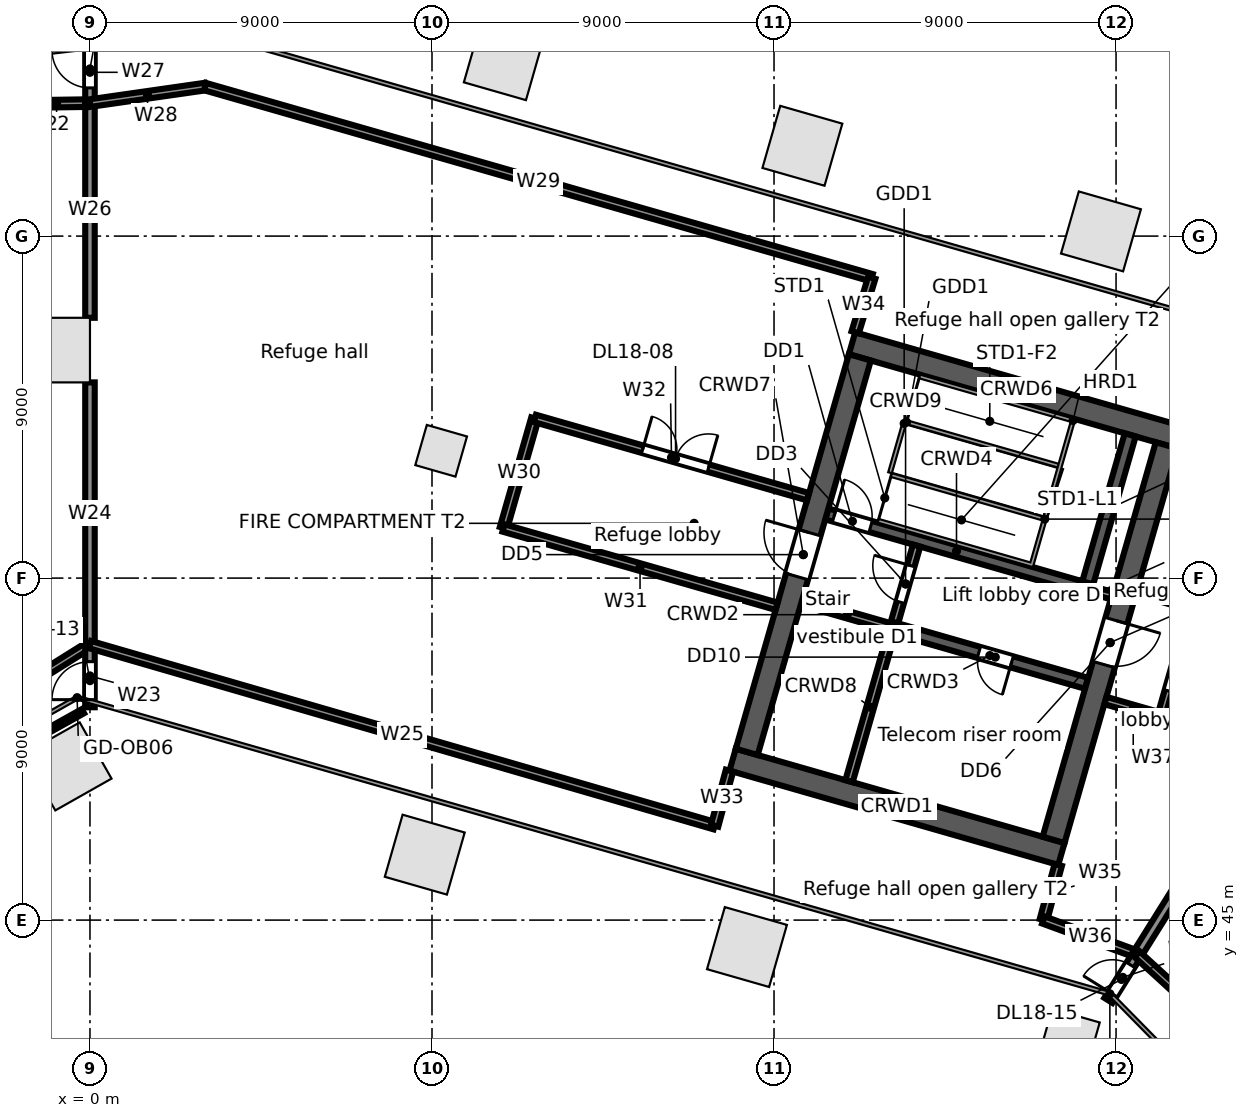
"""IFC4 building model, lengths in metres.
Left out: names, types, materials, properties, quantities, classifications, styles, units other than length and angle.
Written with IfcOpenShell. Run it as: python <this file> out.ifc"""

import sys

from ifc_helpers import new_model, si_unit, direction, frame, frame_2d, origin, origin_2d, place, context, subcontext, project, spatial, rectangle, extrude, element, fill, save


model = new_model("IFC4")
c1 = context("Model", 3, precision=1e-05, world=origin(), true_north=direction((0.0, 1.0)))
c2 = subcontext(c1, "Body", "Model", "MODEL_VIEW")
j1 = project(units=[si_unit("LENGTHUNIT", "METRE"), si_unit("PLANEANGLEUNIT", "RADIAN")], contexts=[c1])
p1 = place(None, origin())
s1 = spatial("IfcSite", under=j1, at=p1, CompositionType="ELEMENT")
p2 = place(p1, origin())
s2 = spatial("IfcBuilding", under=s1, at=p2, CompositionType="ELEMENT")
p3 = place(p2, frame((0.0, 0.0, 91.5)))
s3 = spatial("IfcBuildingStorey", under=s2, at=p3, CompositionType="ELEMENT", Elevation=91.5)
for number, where, z_axis, x_axis in (
    (1, (26.603, 63.124, 0.0), (0.0, 0.0, 1.0), (-0.961, 0.276, 0.0)),
    (2, (18.746, 65.376, 0.0), (0.0, 0.0, 1.0), (-0.961, 0.276, 0.0)),
    (3, (10.89, 67.629, 0.0), (0.0, 0.0, 1.0), (-0.961, 0.276, 0.0)),
    (4, (-0.591, 49.044, 0.0), (0.0, 0.0, 1.0), (0.87, 0.492, 0.0)),
    (5, (8.81, 46.722, 0.0), (0.0, 0.0, 1.0), (0.961, -0.276, 0.0)),
    (6, (17.288, 44.291, 0.0), (0.0, 0.0, 1.0), (0.961, -0.276, 0.0)),
):
    element("IfcColumn", number, at=place(p3, frame(where, z_axis=z_axis, x_axis=x_axis)), inside=s3, PredefinedType="COLUMN", context=c2, shape_type="SweptSolid", body=[
        extrude(rectangle(XDim=1.7, YDim=1.7, at=origin_2d()), origin(), (0.0, 0.0, 1.0), 5.6),
    ])
p4 = place(p3, frame((25.767, 41.86, 0.0), z_axis=(0.0, 0.0, 1.0), x_axis=(0.961261695938, -0.275637355817, 0.0)))
e7 = element("IfcColumn", 7, at=p4, inside=s3, PredefinedType="COLUMN", context=c2, shape_type="SweptSolid", body=[
    extrude(rectangle(XDim=1.3, YDim=1.3, at=origin_2d()), origin(), (0.0, 0.0, 1.0), 5.6),
])
p5 = place(p3, frame((-0.85, 60.0, 0.0), z_axis=(0.0, 0.0, 1.0), x_axis=(0.0, 1.0, 0.0)))
e8 = element("IfcColumn", 8, at=p5, inside=s3, PredefinedType="COLUMN", context=c2, shape_type="SweptSolid", body=[
    extrude(rectangle(XDim=1.7, YDim=1.7, at=origin_2d()), origin(), (0.0, 0.0, 1.0), 5.6),
])
p6 = place(p3, frame((9.241, 57.35, 0.0), z_axis=(0.0, 0.0, 1.0), x_axis=(0.961261695938, -0.275637355817, 0.0)))
e9 = element("IfcColumn", 9, at=p6, inside=s3, PredefinedType="COLUMN", context=c2, shape_type="SweptSolid", body=[
    extrude(rectangle(XDim=1.1, YDim=1.1, at=origin_2d()), origin(), (0.0, 0.0, 1.0), 5.6),
])
p7 = place(p3, frame((16.911, 49.221, 0.0), z_axis=(0.0, 0.0, 1.0), x_axis=(0.96126248289, -0.275634611374, 0.0)))
e10 = element("IfcWall", 10, at=p7, inside=s3, PredefinedType="SOLIDWALL", context=c2, shape_type="SweptSolid", body=[
    extrude(rectangle(XDim=9.0, YDim=0.6, at=frame_2d((4.5, 0.0))), origin(), (0.0, 0.0, 1.0), 5.28),
])
p8 = place(p3, frame((18.728, 53.382, 0.0), z_axis=(0.0, 0.0, 1.0), x_axis=(0.961247070632, -0.275688355216, 0.0)))
e11 = element("IfcWall", 11, at=p8, inside=s3, PredefinedType="SOLIDWALL", context=c2, shape_type="SweptSolid", body=[
    extrude(rectangle(XDim=2.5, YDim=0.2, at=frame_2d((1.25, 0.0))), origin(), (0.0, 0.0, 1.0), 5.28),
])
p9 = place(p3, frame((21.131, 52.692, 0.0), z_axis=(0.0, 0.0, 1.0), x_axis=(0.961271492568, -0.275603188616, 0.0)))
e12 = element("IfcWall", 12, at=p9, inside=s3, PredefinedType="SOLIDWALL", context=c2, shape_type="SweptSolid", body=[
    extrude(rectangle(XDim=5.3, YDim=0.3, at=frame_2d((2.65, 0.0))), origin(), (0.0, 0.0, 1.0), 5.28),
])
p10 = place(p9, frame((2.35, 0.0, 0.0)))
e13 = element("IfcOpeningElement", 13, at=p10, cuts=e12, PredefinedType="OPENING", context=c2, shape_type="SweptSolid", body=[
    extrude(rectangle(XDim=0.9, YDim=2.1, at=frame_2d((0.45, 1.05))), frame((0.0, 0.16, 0.0), z_axis=(0.0, -1.0, 0.0), x_axis=(1.0, 0.0, 0.0)), (0.0, 0.0, 1.0), 0.32),
])
p11 = place(p3, frame((19.389, 55.689, 0.0), z_axis=(0.0, 0.0, 1.0), x_axis=(0.961261397636, -0.275638396117, 0.0)))
e14 = element("IfcWall", 14, at=p11, inside=s3, PredefinedType="SOLIDWALL", context=c2, shape_type="SweptSolid", body=[
    extrude(rectangle(XDim=7.1, YDim=0.3, at=frame_2d((3.55, 0.0))), origin(), (0.0, 0.0, 1.0), 5.28),
])
p12 = place(p11, frame((0.2, 0.0, 0.0)))
e15 = element("IfcOpeningElement", 15, at=p12, cuts=e14, PredefinedType="OPENING", context=c2, shape_type="SweptSolid", body=[
    extrude(rectangle(XDim=1.0, YDim=2.1, at=frame_2d((0.5, 1.05))), frame((0.0, 0.16, 0.0), z_axis=(0.0, -1.0, 0.0), x_axis=(1.0, 0.0, 0.0)), (0.0, 0.0, 1.0), 0.32),
])
p13 = place(p3, frame((26.214, 53.732, 0.0), z_axis=(0.0, 0.0, 1.0), x_axis=(0.96122076476, -0.27578005982, 0.0)))
e16 = element("IfcWall", 16, at=p13, inside=s3, PredefinedType="SOLIDWALL", context=c2, shape_type="SweptSolid", body=[
    extrude(rectangle(XDim=0.7, YDim=0.2, at=frame_2d((0.35, 0.0))), origin(), (0.0, 0.0, 1.0), 5.28),
])
p14 = place(p3, frame((20.053, 60.18, 0.0), z_axis=(0.0, 0.0, 1.0), x_axis=(0.96126248289, -0.275634611374, 0.0)))
e17 = element("IfcWall", 17, at=p14, inside=s3, PredefinedType="SOLIDWALL", context=c2, shape_type="SweptSolid", body=[
    extrude(rectangle(XDim=9.0, YDim=0.6, at=frame_2d((4.5, 0.0))), origin(), (0.0, 0.0, 1.0), 5.28),
])
p15 = place(p3, frame((17.282, 49.427, 0.0), z_axis=(0.0, 0.0, 1.0), x_axis=(0.275631631629, 0.961263337304, 0.0)))
e18 = element("IfcWall", 18, at=p15, inside=s3, PredefinedType="SOLIDWALL", context=c2, shape_type="SweptSolid", body=[
    extrude(rectangle(XDim=10.8, YDim=0.6, at=frame_2d((5.4, 0.0))), origin(), (0.0, 0.0, 1.0), 5.28),
])
p16 = place(p15, frame((4.8, 0.0, 0.0)))
e19 = element("IfcOpeningElement", 19, at=p16, cuts=e18, PredefinedType="OPENING", context=c2, shape_type="SweptSolid", body=[
    extrude(rectangle(XDim=1.2, YDim=2.1, at=frame_2d((0.6, 1.05))), frame((0.0, 0.31, 0.0), z_axis=(0.0, -1.0, 0.0), x_axis=(1.0, 0.0, 0.0)), (0.0, 0.0, 1.0), 0.62),
])
p17 = place(p3, frame((19.973, 48.655, 0.0), z_axis=(0.0, 0.0, 1.0), x_axis=(0.275668441653, 0.961252781674, 0.0)))
e20 = element("IfcWall", 20, at=p17, inside=s3, PredefinedType="SOLIDWALL", context=c2, shape_type="SweptSolid", body=[
    extrude(rectangle(XDim=4.05, YDim=0.2, at=frame_2d((2.025, 0.0))), origin(), (0.0, 0.0, 1.0), 5.28),
])
p18 = place(p3, frame((21.172, 52.837, 0.0), z_axis=(0.0, 0.0, 1.0), x_axis=(0.275657676022, 0.961255868981, 0.0)))
e21 = element("IfcWall", 21, at=p18, inside=s3, PredefinedType="PARTITIONING", context=c2, shape_type="SweptSolid", body=[
    extrude(rectangle(XDim=2.1, YDim=0.2, at=frame_2d((1.05, 0.0))), origin(), (0.0, 0.0, 1.0), 5.28),
])
p19 = place(p18, frame((0.55, 0.0, 0.0)))
e22 = element("IfcOpeningElement", 22, at=p19, cuts=e21, PredefinedType="OPENING", context=c2, shape_type="SweptSolid", body=[
    extrude(rectangle(XDim=1.0, YDim=2.1, at=frame_2d((0.5, 1.05))), frame((0.0, 0.11, 0.0), z_axis=(0.0, -1.0, 0.0), x_axis=(1.0, 0.0, 0.0)), (0.0, 0.0, 1.0), 0.22),
])
p20 = place(p3, frame((26.256, 53.876, 0.0), z_axis=(0.0, 0.0, 1.0), x_axis=(0.275612739511, 0.961268754209, 0.0)))
e23 = element("IfcWall", 23, at=p20, inside=s3, PredefinedType="SOLIDWALL", context=c2, shape_type="SweptSolid", body=[
    extrude(rectangle(XDim=4.05, YDim=0.3, at=frame_2d((2.025, 0.0))), origin(), (0.0, 0.0, 1.0), 5.28),
])
p21 = place(p3, frame((25.356, 47.112, 0.0), z_axis=(0.0, 0.0, 1.0), x_axis=(0.275631631629, 0.961263337304, 0.0)))
e24 = element("IfcWall", 24, at=p21, inside=s3, PredefinedType="SOLIDWALL", context=c2, shape_type="SweptSolid", body=[
    extrude(rectangle(XDim=10.8, YDim=0.6, at=frame_2d((5.4, 0.0))), origin(), (0.0, 0.0, 1.0), 5.28),
])
p22 = place(p21, frame((4.8, 0.0, 0.0)))
e25 = element("IfcOpeningElement", 25, at=p22, cuts=e24, PredefinedType="OPENING", context=c2, shape_type="SweptSolid", body=[
    extrude(rectangle(XDim=1.2, YDim=2.1, at=frame_2d((0.6, 1.05))), frame((0.0, 0.31, 0.0), z_axis=(0.0, -1.0, 0.0), x_axis=(1.0, 0.0, 0.0)), (0.0, 0.0, 1.0), 0.62),
])
p23 = place(p3, frame((-14.169, 42.684, 0.0), z_axis=(0.0, 0.0, 1.0), x_axis=(0.872958370826, 0.487794713793, 0.0)))
e26 = element("IfcWall", 26, at=p23, inside=s3, PredefinedType="PARTITIONING", context=c2, shape_type="SweptSolid", body=[
    extrude(rectangle(XDim=16.019, YDim=0.125, at=frame_2d((8.01, 0.0))), origin(), (0.0, 0.0, 1.0), 4.342),
])
p24 = place(p3, frame((-4.821, 49.23, 0.0), z_axis=(0.0, 0.0, 1.0), x_axis=(0.847455386679, 0.530866619396, 0.0)))
e27 = element("IfcWall", 27, at=p24, inside=s3, PredefinedType="PARTITIONING", context=c2, shape_type="SweptSolid", body=[
    extrude(rectangle(XDim=5.689, YDim=0.2, at=frame_2d((2.844, 0.0))), origin(), (0.0, 0.0, 1.0), 4.342),
])
p25 = place(p3, frame((-1.757, 66.474, 0.0), z_axis=(0.0, 0.0, 1.0), x_axis=(0.999891555363, 0.014726761827, 0.0)))
e28 = element("IfcWall", 28, at=p25, inside=s3, PredefinedType="PARTITIONING", context=c2, shape_type="SweptSolid", body=[
    extrude(rectangle(XDim=1.757, YDim=0.2, at=frame_2d((0.879, 0.0))), origin(), (0.0, 0.0, 1.0), 4.552),
])
p26 = place(p3, frame((0.0, 50.601, 0.0), z_axis=(0.0, 0.0, 1.0), x_axis=(0.0, 1.0, 0.0)))
e29 = element("IfcWall", 29, at=p26, inside=s3, PredefinedType="PARTITIONING", context=c2, shape_type="SweptSolid", body=[
    extrude(rectangle(XDim=1.649, YDim=0.25, at=frame_2d((0.824, 0.0))), origin(), (0.0, 0.0, 1.0), 5.28),
])
p27 = place(p26, frame((0.2, 0.0, 0.0)))
e30 = element("IfcOpeningElement", 30, at=p27, cuts=e29, PredefinedType="OPENING", context=c2, shape_type="SweptSolid", body=[
    extrude(rectangle(XDim=1.0, YDim=2.1, at=frame_2d((0.5, 1.05))), frame((0.0, 0.135, 0.0), z_axis=(0.0, -1.0, 0.0), x_axis=(1.0, 0.0, 0.0)), (0.0, 0.0, 1.0), 0.27),
])
p28 = place(p3, frame((0.0, 52.25, 0.0), z_axis=(0.0, 0.0, 1.0), x_axis=(0.0, 1.0, 0.0)))
e31 = element("IfcWall", 31, at=p28, inside=s3, PredefinedType="PARTITIONING", context=c2, shape_type="SweptSolid", body=[
    extrude(rectangle(XDim=6.9, YDim=0.25, at=frame_2d((3.45, 0.0))), origin(), (0.0, 0.0, 1.0), 5.28),
])
p29 = place(p3, frame((0.0, 52.25, 0.0), z_axis=(0.0, 0.0, 1.0), x_axis=(0.960438830998, -0.278491026628, 0.0)))
e32 = element("IfcWall", 32, at=p29, inside=s3, PredefinedType="PARTITIONING", context=c2, shape_type="SweptSolid", body=[
    extrude(rectangle(XDim=17.114, YDim=0.2, at=frame_2d((8.557, 0.0))), origin(), (0.0, 0.0, 1.0), 4.342),
])
p30 = place(p3, frame((0.0, 60.85, 0.0), z_axis=(0.0, 0.0, 1.0), x_axis=(0.0, 1.0, 0.0)))
e33 = element("IfcWall", 33, at=p30, inside=s3, PredefinedType="PARTITIONING", context=c2, shape_type="SweptSolid", body=[
    extrude(rectangle(XDim=5.65, YDim=0.25, at=frame_2d((2.825, 0.0))), origin(), (0.0, 0.0, 1.0), 4.552),
])
p31 = place(p3, frame((0.0, 66.5, 0.0), z_axis=(0.0, 0.0, 1.0), x_axis=(0.0, 1.0, 0.0)))
e34 = element("IfcWall", 34, at=p31, inside=s3, PredefinedType="PARTITIONING", context=c2, shape_type="SweptSolid", body=[
    extrude(rectangle(XDim=1.62, YDim=0.25, at=frame_2d((0.81, 0.0))), origin(), (0.0, 0.0, 1.0), 4.552),
])
p32 = place(p31, frame((0.4, 0.0, 0.0)))
e35 = element("IfcOpeningElement", 35, at=p32, cuts=e34, PredefinedType="OPENING", context=c2, shape_type="SweptSolid", body=[
    extrude(rectangle(XDim=1.0, YDim=2.1, at=frame_2d((0.5, 1.05))), frame((0.0, 0.135, 0.0), z_axis=(0.0, -1.0, 0.0), x_axis=(1.0, 0.0, 0.0)), (0.0, 0.0, 1.0), 0.27),
])
p33 = place(p3, frame((0.0, 66.5, 0.0), z_axis=(0.0, 0.0, 1.0), x_axis=(0.989887165849, 0.1418569663, 0.0)))
e36 = element("IfcWall", 36, at=p33, inside=s3, PredefinedType="PARTITIONING", context=c2, shape_type="SweptSolid", body=[
    extrude(rectangle(XDim=3.06, YDim=0.2, at=frame_2d((1.53, 0.0))), origin(), (0.0, 0.0, 1.0), 4.342),
])
p34 = place(p3, frame((3.029, 66.934, 0.0), z_axis=(0.0, 0.0, 1.0), x_axis=(0.961266574638, -0.2756203412, 0.0)))
e37 = element("IfcWall", 37, at=p34, inside=s3, PredefinedType="PARTITIONING", context=c2, shape_type="SweptSolid", body=[
    extrude(rectangle(XDim=18.25, YDim=0.2, at=frame_2d((9.125, 0.0))), origin(), (0.0, 0.0, 1.0), 4.342),
])
p35 = place(p3, frame((10.881, 55.319, 0.0), z_axis=(0.0, 0.0, 1.0), x_axis=(0.275634611374, 0.96126248289, 0.0)))
e38 = element("IfcWall", 38, at=p35, inside=s3, PredefinedType="PARTITIONING", context=c2, shape_type="SweptSolid", body=[
    extrude(rectangle(XDim=3.0, YDim=0.2, at=frame_2d((1.5, 0.0))), origin(), (0.0, 0.0, 1.0), 4.342),
])
p36 = place(p3, frame((10.881, 55.319, 0.0), z_axis=(0.0, 0.0, 1.0), x_axis=(0.96128947032, -0.275540476614, 0.0)))
e39 = element("IfcWall", 39, at=p36, inside=s3, PredefinedType="PARTITIONING", context=c2, shape_type="SweptSolid", body=[
    extrude(rectangle(XDim=7.476, YDim=0.2, at=frame_2d((3.738, 0.0))), origin(), (0.0, 0.0, 1.0), 4.342),
])
p37 = place(p3, frame((11.708, 58.203, 0.0), z_axis=(0.0, 0.0, 1.0), x_axis=(0.961263518588, -0.275630999402, 0.0)))
e40 = element("IfcWall", 40, at=p37, inside=s3, PredefinedType="PARTITIONING", context=c2, shape_type="SweptSolid", body=[
    extrude(rectangle(XDim=7.477, YDim=0.2, at=frame_2d((3.738, 0.0))), origin(), (0.0, 0.0, 1.0), 4.342),
])
p38 = place(p37, frame((2.95, 0.0, 0.0)))
e41 = element("IfcOpeningElement", 41, at=p38, cuts=e40, PredefinedType="OPENING", context=c2, shape_type="SweptSolid", body=[
    extrude(rectangle(XDim=1.8, YDim=2.1, at=frame_2d((0.9, 1.05))), frame((0.0, 0.11, 0.0), z_axis=(0.0, -1.0, 0.0), x_axis=(1.0, 0.0, 0.0)), (0.0, 0.0, 1.0), 0.22),
])
p39 = place(p3, frame((16.437, 47.484, 0.0), z_axis=(0.0, 0.0, 1.0), x_axis=(0.260405090968, 0.965499450335, 0.0)))
e42 = element("IfcWall", 42, at=p39, inside=s3, PredefinedType="PARTITIONING", context=c2, shape_type="SweptSolid", body=[
    extrude(rectangle(XDim=1.501, YDim=0.2, at=frame_2d((0.75, 0.0))), origin(), (0.0, 0.0, 1.0), 5.28),
])
p40 = place(p3, frame((20.136, 60.468, 0.0), z_axis=(0.0, 0.0, 1.0), x_axis=(0.290540119102, 0.956862811061, 0.0)))
e43 = element("IfcWall", 43, at=p40, inside=s3, PredefinedType="PARTITIONING", context=c2, shape_type="SweptSolid", body=[
    extrude(rectangle(XDim=1.501, YDim=0.2, at=frame_2d((0.75, 0.0))), origin(), (0.0, 0.0, 1.0), 5.28),
])
p41 = place(p3, frame((25.088, 45.004, 0.0), z_axis=(0.0, 0.0, 1.0), x_axis=(0.260761429939, 0.965403271517, 0.0)))
e44 = element("IfcWall", 44, at=p41, inside=s3, PredefinedType="PARTITIONING", context=c2, shape_type="SweptSolid", body=[
    extrude(rectangle(XDim=1.5, YDim=0.2, at=frame_2d((0.75, 0.0))), origin(), (0.0, 0.0, 1.0), 5.28),
])
p42 = place(p3, frame((25.088, 45.004, 0.0), z_axis=(0.0, 0.0, 1.0), x_axis=(0.93889532653, -0.344202797519, 0.0)))
e45 = element("IfcWall", 45, at=p42, inside=s3, PredefinedType="PARTITIONING", context=c2, shape_type="SweptSolid", body=[
    extrude(rectangle(XDim=2.629, YDim=0.2, at=frame_2d((1.314, 0.0))), origin(), (0.0, 0.0, 1.0), 4.452),
])
p43 = place(p3, frame((26.72, 50.778, 0.0), z_axis=(0.0, 0.0, 1.0), x_axis=(0.961202731862, -0.275842905041, 0.0)))
e46 = element("IfcWall", 46, at=p43, inside=s3, PredefinedType="PARTITIONING", context=c2, shape_type="SweptSolid", body=[
    extrude(rectangle(XDim=1.523, YDim=0.2, at=frame_2d((0.762, 0.0))), origin(), (0.0, 0.0, 1.0), 5.28),
])
p44 = place(p3, frame((26.799, 42.887, 0.0), z_axis=(0.0, 0.0, 1.0), x_axis=(0.529614967624, 0.848238165888, 0.0)))
e47 = element("IfcWall", 47, at=p44, inside=s3, PredefinedType="PARTITIONING", context=c2, shape_type="SweptSolid", body=[
    extrude(rectangle(XDim=1.429, YDim=0.25, at=frame_2d((0.714, 0.0))), origin(), (0.0, 0.0, 1.0), 5.28),
])
p45 = place(p44, frame((0.2, 0.0, 0.0)))
e48 = element("IfcOpeningElement", 48, at=p45, cuts=e47, PredefinedType="OPENING", context=c2, shape_type="SweptSolid", body=[
    extrude(rectangle(XDim=0.9, YDim=2.1, at=frame_2d((0.45, 1.05))), frame((0.0, 0.135, 0.0), z_axis=(0.0, -1.0, 0.0), x_axis=(1.0, 0.0, 0.0)), (0.0, 0.0, 1.0), 0.27),
])
p46 = place(p3, frame((27.547, 53.662, 0.0), z_axis=(0.0, 0.0, 1.0), x_axis=(0.961190533403, -0.27588540827, 0.0)))
e49 = element("IfcWall", 49, at=p46, inside=s3, PredefinedType="PARTITIONING", context=c2, shape_type="SweptSolid", body=[
    extrude(rectangle(XDim=1.523, YDim=0.2, at=frame_2d((0.761, 0.0))), origin(), (0.0, 0.0, 1.0), 5.28),
])
p47 = place(p3, frame((27.556, 44.099, 0.0), z_axis=(0.0, 0.0, 1.0), x_axis=(0.529901019477, 0.848059496472, 0.0)))
e50 = element("IfcWall", 50, at=p47, inside=s3, PredefinedType="PARTITIONING", context=c2, shape_type="SweptSolid", body=[
    extrude(rectangle(XDim=6.5, YDim=0.25, at=frame_2d((3.25, 0.0))), origin(), (0.0, 0.0, 1.0), 5.28),
])
p48 = place(p3, frame((27.556, 44.099, 0.0), z_axis=(0.0, 0.0, 1.0), x_axis=(0.737709390417, -0.675118400942, 0.0)))
e51 = element("IfcWall", 51, at=p48, inside=s3, PredefinedType="PARTITIONING", context=c2, shape_type="SweptSolid", body=[
    extrude(rectangle(XDim=5.254, YDim=0.2, at=frame_2d((2.627, 0.0))), origin(), (0.0, 0.0, 1.0), 5.28),
])
p49 = place(p3, frame((28.184, 50.358, 0.0), z_axis=(0.0, 0.0, 1.0), x_axis=(0.27561305073, 0.961268664977, 0.0)))
e52 = element("IfcWall", 52, at=p49, inside=s3, PredefinedType="PARTITIONING", context=c2, shape_type="SweptSolid", body=[
    extrude(rectangle(XDim=3.0, YDim=0.2, at=frame_2d((1.5, 0.0))), origin(), (0.0, 0.0, 1.0), 4.86),
])
p50 = place(p49, frame((0.7, 0.0, 0.0)))
e53 = element("IfcOpeningElement", 53, at=p50, cuts=e52, PredefinedType="OPENING", context=c2, shape_type="SweptSolid", body=[
    extrude(rectangle(XDim=1.8, YDim=2.1, at=frame_2d((0.9, 1.05))), frame((0.0, 0.11, 0.0), z_axis=(0.0, -1.0, 0.0), x_axis=(1.0, 0.0, 0.0)), (0.0, 0.0, 1.0), 0.22),
])
p51 = place(p12, origin())
e54 = element("IfcDoor", 54, at=p51, inside=s3, OperationType="SINGLE_SWING_LEFT", PredefinedType="DOOR", context=c2, shape_type="SweptSolid", body=[
    extrude(rectangle(XDim=1.0, YDim=2.1, at=frame_2d((0.5, 1.05))), frame((0.0, 0.025, 0.0), z_axis=(0.0, -1.0, 0.0), x_axis=(1.0, 0.0, 0.0)), (0.0, 0.0, 1.0), 0.05),
])
fill(e15, e54)
p52 = place(p19, origin())
e55 = element("IfcDoor", 55, at=p52, inside=s3, OperationType="SINGLE_SWING_RIGHT", PredefinedType="DOOR", context=c2, shape_type="SweptSolid", body=[
    extrude(rectangle(XDim=1.0, YDim=2.1, at=frame_2d((0.5, 1.05))), frame((0.0, 0.025, 0.0), z_axis=(0.0, -1.0, 0.0), x_axis=(1.0, 0.0, 0.0)), (0.0, 0.0, 1.0), 0.05),
])
fill(e22, e55)
p53 = place(p16, origin())
e56 = element("IfcDoor", 56, at=p53, inside=s3, OperationType="SINGLE_SWING_RIGHT", PredefinedType="DOOR", context=c2, shape_type="SweptSolid", body=[
    extrude(rectangle(XDim=1.2, YDim=2.1, at=frame_2d((0.6, 1.05))), frame((0.0, 0.025, 0.0), z_axis=(0.0, -1.0, 0.0), x_axis=(1.0, 0.0, 0.0)), (0.0, 0.0, 1.0), 0.05),
])
fill(e19, e56)
p54 = place(p22, frame((1.2, 0.0, 0.0), z_axis=(0.0, 0.0, 1.0), x_axis=(-1.0, 0.0, 0.0)))
e57 = element("IfcDoor", 57, at=p54, inside=s3, OperationType="SINGLE_SWING_LEFT", PredefinedType="DOOR", context=c2, shape_type="SweptSolid", body=[
    extrude(rectangle(XDim=1.2, YDim=2.1, at=frame_2d((0.6, 1.05))), frame((0.0, 0.025, 0.0), z_axis=(0.0, -1.0, 0.0), x_axis=(1.0, 0.0, 0.0)), (0.0, 0.0, 1.0), 0.05),
])
fill(e25, e57)
p55 = place(p10, frame((0.9, 0.0, 0.0), z_axis=(0.0, 0.0, 1.0), x_axis=(-1.0, 0.0, 0.0)))
e58 = element("IfcDoor", 58, at=p55, inside=s3, OperationType="SINGLE_SWING_LEFT", PredefinedType="DOOR", context=c2, shape_type="SweptSolid", body=[
    extrude(rectangle(XDim=0.9, YDim=2.1, at=frame_2d((0.45, 1.05))), frame((0.0, 0.025, 0.0), z_axis=(0.0, -1.0, 0.0), x_axis=(1.0, 0.0, 0.0)), (0.0, 0.0, 1.0), 0.05),
])
fill(e13, e58)
p56 = place(p38, origin())
e59 = element("IfcDoor", 59, at=p56, inside=s3, OperationType="DOUBLE_DOOR_SINGLE_SWING", PredefinedType="DOOR", context=c2, shape_type="SweptSolid", body=[
    extrude(rectangle(XDim=1.8, YDim=2.1, at=frame_2d((0.9, 1.05))), frame((0.0, 0.025, 0.0), z_axis=(0.0, -1.0, 0.0), x_axis=(1.0, 0.0, 0.0)), (0.0, 0.0, 1.0), 0.05),
])
fill(e41, e59)
p57 = place(p50, frame((1.8, 0.0, 0.0), z_axis=(0.0, 0.0, 1.0), x_axis=(-1.0, 0.0, 0.0)))
e60 = element("IfcDoor", 60, at=p57, inside=s3, OperationType="DOUBLE_DOOR_SINGLE_SWING", PredefinedType="DOOR", context=c2, shape_type="SweptSolid", body=[
    extrude(rectangle(XDim=1.8, YDim=2.1, at=frame_2d((0.9, 1.05))), frame((0.0, 0.025, 0.0), z_axis=(0.0, -1.0, 0.0), x_axis=(1.0, 0.0, 0.0)), (0.0, 0.0, 1.0), 0.05),
])
fill(e53, e60)
p58 = place(p27, origin())
e61 = element("IfcDoor", 61, at=p58, inside=s3, OperationType="SINGLE_SWING_LEFT", PredefinedType="DOOR", context=c2, shape_type="SweptSolid", body=[
    extrude(rectangle(XDim=1.0, YDim=2.1, at=frame_2d((0.5, 1.05))), frame((0.0, 0.025, 0.0), z_axis=(0.0, -1.0, 0.0), x_axis=(1.0, 0.0, 0.0)), (0.0, 0.0, 1.0), 0.05),
])
fill(e30, e61)
p59 = place(p32, origin())
e62 = element("IfcDoor", 62, at=p59, inside=s3, OperationType="SINGLE_SWING_RIGHT", PredefinedType="DOOR", context=c2, shape_type="SweptSolid", body=[
    extrude(rectangle(XDim=1.0, YDim=2.1, at=frame_2d((0.5, 1.05))), frame((0.0, 0.025, 0.0), z_axis=(0.0, -1.0, 0.0), x_axis=(1.0, 0.0, 0.0)), (0.0, 0.0, 1.0), 0.05),
])
fill(e35, e62)
p60 = place(p45, origin())
e63 = element("IfcDoor", 63, at=p60, inside=s3, OperationType="SINGLE_SWING_LEFT", PredefinedType="DOOR", context=c2, shape_type="SweptSolid", body=[
    extrude(rectangle(XDim=0.9, YDim=2.1, at=frame_2d((0.45, 1.05))), frame((0.0, 0.025, 0.0), z_axis=(0.0, -1.0, 0.0), x_axis=(1.0, 0.0, 0.0)), (0.0, 0.0, 1.0), 0.05),
])
fill(e48, e63)
save(model, sys.argv[1])
